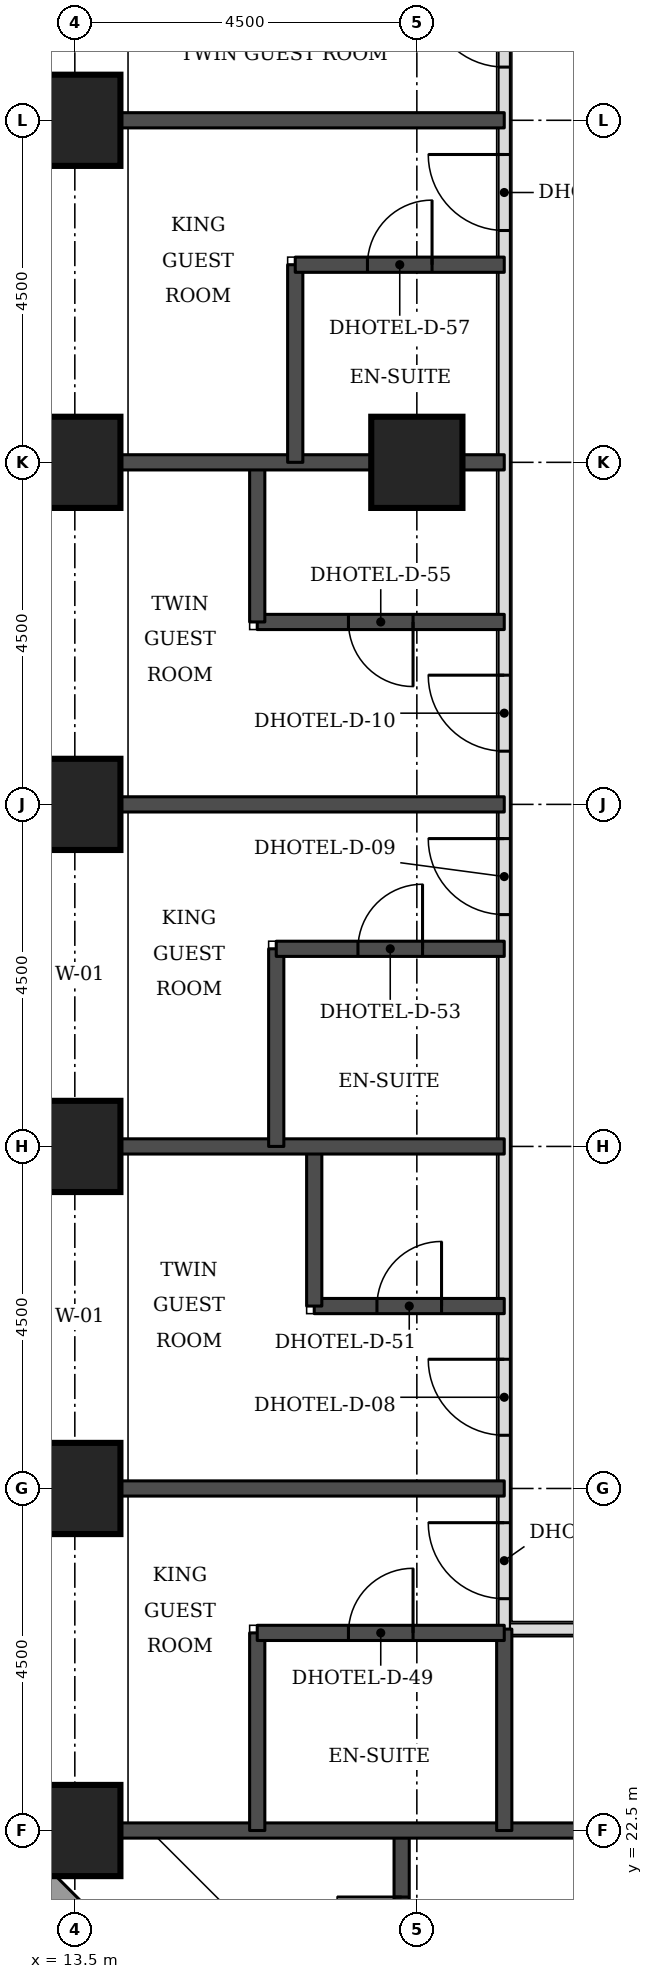
"""IFC4 building model, lengths in metres.
Left out: names, types, materials, properties, quantities, classifications, styles, units other than length and angle.
Written with IfcOpenShell. Run it as: python <this file> out.ifc"""

import sys

from ifc_helpers import new_model, si_unit, direction, frame, frame_2d, origin, origin_2d, place, context, subcontext, project, spatial, rectangle, extrude, element, fill, save


model = new_model("IFC4")
c1 = context("Model", 3, precision=1e-05, world=origin(), true_north=direction((0.0, 1.0)))
c2 = subcontext(c1, "Body", "Model", "MODEL_VIEW")
j1 = project(units=[si_unit("LENGTHUNIT", "METRE"), si_unit("PLANEANGLEUNIT", "RADIAN")], contexts=[c1])
p1 = place(None, origin())
s1 = spatial("IfcSite", under=j1, at=p1, CompositionType="ELEMENT")
p2 = place(p1, origin())
s2 = spatial("IfcBuilding", under=s1, at=p2, CompositionType="ELEMENT")
p3 = place(p2, frame((0.0, 0.0, 59.4)))
s3 = spatial("IfcBuildingStorey", under=s2, at=p3, CompositionType="ELEMENT", Elevation=59.4)
for number, where, z_axis, x_axis in (
    (1, (13.5, 22.5, 0.0), (0.0, 0.0, 1.0), (1.0, 0.0, 0.0)),
    (2, (13.5, 27.0, 0.0), (0.0, 0.0, 1.0), (1.0, 0.0, 0.0)),
    (3, (13.5, 31.5, 0.0), (0.0, 0.0, 1.0), (1.0, 0.0, 0.0)),
    (4, (13.5, 36.0, 0.0), (0.0, 0.0, 1.0), (1.0, 0.0, 0.0)),
    (5, (13.5, 40.5, 0.0), (0.0, 0.0, 1.0), (1.0, 0.0, 0.0)),
    (6, (18.0, 40.5, 0.0), (0.0, 0.0, 1.0), (1.0, 0.0, 0.0)),
    (7, (13.5, 45.0, 0.0), (0.0, 0.0, 1.0), (1.0, 0.0, 0.0)),
):
    element("IfcColumn", number, at=place(p3, frame(where, z_axis=z_axis, x_axis=x_axis)), inside=s3, PredefinedType="COLUMN", context=c2, shape_type="SweptSolid", body=[
        extrude(rectangle(XDim=1.2, YDim=1.2, at=origin_2d()), origin(), (0.0, 0.0, 1.0), 3.3),
    ])
p4 = place(p3, frame((12.674, 22.23, 0.0), z_axis=(0.0, 0.0, 1.0), x_axis=(0.707106781187, -0.707106781187, 0.0)))
e8 = element("IfcWall", 8, at=p4, inside=s3, PredefinedType="STANDARD", context=c2, shape_type="SweptSolid", body=[
    extrude(rectangle(XDim=7.151, YDim=0.35, at=frame_2d((3.576, 0.0))), origin(), (0.0, 0.0, 1.0), 3.055),
])
p5 = place(p4, frame((1.926, 0.0, 0.8)))
e9 = element("IfcOpeningElement", 9, at=p5, cuts=e8, PredefinedType="OPENING", context=c2, shape_type="SweptSolid", body=[
    extrude(rectangle(XDim=3.3, YDim=1.5, at=frame_2d((1.65, 0.75))), frame((0.0, 0.185, 0.0), z_axis=(0.0, -1.0, 0.0), x_axis=(1.0, 0.0, 0.0)), (0.0, 0.0, 1.0), 0.37),
])
p6 = place(p3, frame((19.15, 25.15, 0.0), z_axis=(0.0, 0.0, 1.0), x_axis=(1.0, 0.0, 0.0)))
e10 = element("IfcWall", 10, at=p6, inside=s3, PredefinedType="PARTITIONING", context=c2, shape_type="SweptSolid", body=[
    extrude(rectangle(XDim=32.35, YDim=0.15, at=frame_2d((16.175, 0.0))), origin(), (0.0, 0.0, 1.0), 3.08),
])
p7 = place(p6, frame((6.4, 0.0, 0.0)))
e11 = element("IfcOpeningElement", 11, at=p7, cuts=e10, PredefinedType="OPENING", context=c2, shape_type="SweptSolid", body=[
    extrude(rectangle(XDim=1.0, YDim=2.1, at=frame_2d((0.5, 1.05))), frame((0.0, 0.085, 0.0), z_axis=(0.0, -1.0, 0.0), x_axis=(1.0, 0.0, 0.0)), (0.0, 0.0, 1.0), 0.17),
])
p8 = place(p6, frame((10.5, 0.0, 0.0)))
e12 = element("IfcOpeningElement", 12, at=p8, cuts=e10, PredefinedType="OPENING", context=c2, shape_type="SweptSolid", body=[
    extrude(rectangle(XDim=1.0, YDim=2.1, at=frame_2d((0.5, 1.05))), frame((0.0, 0.085, 0.0), z_axis=(0.0, -1.0, 0.0), x_axis=(1.0, 0.0, 0.0)), (0.0, 0.0, 1.0), 0.17),
])
p9 = place(p6, frame((22.45, 0.0, 0.0)))
e13 = element("IfcOpeningElement", 13, at=p9, cuts=e10, PredefinedType="OPENING", context=c2, shape_type="SweptSolid", body=[
    extrude(rectangle(XDim=1.0, YDim=2.1, at=frame_2d((0.5, 1.05))), frame((0.0, 0.085, 0.0), z_axis=(0.0, -1.0, 0.0), x_axis=(1.0, 0.0, 0.0)), (0.0, 0.0, 1.0), 0.17),
])
p10 = place(p6, frame((26.55, 0.0, 0.0)))
e14 = element("IfcOpeningElement", 14, at=p10, cuts=e10, PredefinedType="OPENING", context=c2, shape_type="SweptSolid", body=[
    extrude(rectangle(XDim=1.0, YDim=2.1, at=frame_2d((0.5, 1.05))), frame((0.0, 0.085, 0.0), z_axis=(0.0, -1.0, 0.0), x_axis=(1.0, 0.0, 0.0)), (0.0, 0.0, 1.0), 0.17),
])
p11 = place(p6, frame((1.175, 0.0, 0.0)))
e15 = element("IfcOpeningElement", 15, at=p11, cuts=e10, PredefinedType="OPENING", context=c2, shape_type="SweptSolid", body=[
    extrude(rectangle(XDim=1.0, YDim=2.1, at=frame_2d((0.5, 1.05))), frame((0.0, 0.085, 0.0), z_axis=(0.0, -1.0, 0.0), x_axis=(1.0, 0.0, 0.0)), (0.0, 0.0, 1.0), 0.17),
])
p12 = place(p6, frame((30.85, 0.0, 0.0)))
e16 = element("IfcOpeningElement", 16, at=p12, cuts=e10, PredefinedType="OPENING", context=c2, shape_type="SweptSolid", body=[
    extrude(rectangle(XDim=1.0, YDim=2.1, at=frame_2d((0.5, 1.05))), frame((0.0, 0.085, 0.0), z_axis=(0.0, -1.0, 0.0), x_axis=(1.0, 0.0, 0.0)), (0.0, 0.0, 1.0), 0.17),
])
p13 = place(p3, frame((19.15, 25.15, 0.0), z_axis=(0.0, 0.0, 1.0), x_axis=(0.0, 1.0, 0.0)))
e17 = element("IfcWall", 17, at=p13, inside=s3, PredefinedType="PARTITIONING", context=c2, shape_type="SweptSolid", body=[
    extrude(rectangle(XDim=24.35, YDim=0.15, at=frame_2d((12.175, 0.0))), origin(), (0.0, 0.0, 1.0), 3.08),
])
p14 = place(p13, frame((0.4, 0.0, 0.0)))
e18 = element("IfcOpeningElement", 18, at=p14, cuts=e17, PredefinedType="OPENING", context=c2, shape_type="SweptSolid", body=[
    extrude(rectangle(XDim=1.0, YDim=2.1, at=frame_2d((0.5, 1.05))), frame((0.0, 0.085, 0.0), z_axis=(0.0, -1.0, 0.0), x_axis=(1.0, 0.0, 0.0)), (0.0, 0.0, 1.0), 0.17),
])
p15 = place(p13, frame((2.55, 0.0, 0.0)))
e19 = element("IfcOpeningElement", 19, at=p15, cuts=e17, PredefinedType="OPENING", context=c2, shape_type="SweptSolid", body=[
    extrude(rectangle(XDim=1.0, YDim=2.1, at=frame_2d((0.5, 1.05))), frame((0.0, 0.085, 0.0), z_axis=(0.0, -1.0, 0.0), x_axis=(1.0, 0.0, 0.0)), (0.0, 0.0, 1.0), 0.17),
])
p16 = place(p13, frame((9.4, 0.0, 0.0)))
e20 = element("IfcOpeningElement", 20, at=p16, cuts=e17, PredefinedType="OPENING", context=c2, shape_type="SweptSolid", body=[
    extrude(rectangle(XDim=1.0, YDim=2.1, at=frame_2d((0.5, 1.05))), frame((0.0, 0.085, 0.0), z_axis=(0.0, -1.0, 0.0), x_axis=(1.0, 0.0, 0.0)), (0.0, 0.0, 1.0), 0.17),
])
p17 = place(p13, frame((11.55, 0.0, 0.0)))
e21 = element("IfcOpeningElement", 21, at=p17, cuts=e17, PredefinedType="OPENING", context=c2, shape_type="SweptSolid", body=[
    extrude(rectangle(XDim=1.0, YDim=2.1, at=frame_2d((0.5, 1.05))), frame((0.0, 0.085, 0.0), z_axis=(0.0, -1.0, 0.0), x_axis=(1.0, 0.0, 0.0)), (0.0, 0.0, 1.0), 0.17),
])
p18 = place(p13, frame((18.4, 0.0, 0.0)))
e22 = element("IfcOpeningElement", 22, at=p18, cuts=e17, PredefinedType="OPENING", context=c2, shape_type="SweptSolid", body=[
    extrude(rectangle(XDim=1.0, YDim=2.1, at=frame_2d((0.5, 1.05))), frame((0.0, 0.085, 0.0), z_axis=(0.0, -1.0, 0.0), x_axis=(1.0, 0.0, 0.0)), (0.0, 0.0, 1.0), 0.17),
])
p19 = place(p13, frame((20.55, 0.0, 0.0)))
e23 = element("IfcOpeningElement", 23, at=p19, cuts=e17, PredefinedType="OPENING", context=c2, shape_type="SweptSolid", body=[
    extrude(rectangle(XDim=1.0, YDim=2.1, at=frame_2d((0.5, 1.05))), frame((0.0, 0.085, 0.0), z_axis=(0.0, -1.0, 0.0), x_axis=(1.0, 0.0, 0.0)), (0.0, 0.0, 1.0), 0.17),
])
p20 = place(p3, frame((17.8, 20.0, 0.0), z_axis=(0.0, 0.0, 1.0), x_axis=(0.0, 1.0, 0.0)))
e24 = element("IfcWall", 24, at=p20, inside=s3, PredefinedType="SOLIDWALL", context=c2, shape_type="SweptSolid", body=[
    extrude(rectangle(XDim=2.5, YDim=0.2, at=frame_2d((1.25, 0.0))), origin(), (0.0, 0.0, 1.0), 3.08),
])
p21 = place(p20, frame((0.775, 0.0, 0.0)))
e25 = element("IfcOpeningElement", 25, at=p21, cuts=e24, PredefinedType="OPENING", context=c2, shape_type="SweptSolid", body=[
    extrude(rectangle(XDim=0.85, YDim=2.1, at=frame_2d((0.425, 1.05))), frame((0.0, 0.11, 0.0), z_axis=(0.0, -1.0, 0.0), x_axis=(1.0, 0.0, 0.0)), (0.0, 0.0, 1.0), 0.22),
])
p22 = place(p3, frame((14.1, 22.5, 0.0), z_axis=(0.0, 0.0, 1.0), x_axis=(1.0, 0.0, 0.0)))
e26 = element("IfcWall", 26, at=p22, inside=s3, PredefinedType="SOLIDWALL", context=c2, shape_type="SweptSolid", body=[
    extrude(rectangle(XDim=6.1, YDim=0.2, at=frame_2d((3.05, 0.0))), origin(), (0.0, 0.0, 1.0), 3.08),
])
p23 = place(p3, frame((15.9, 22.5, 0.0), z_axis=(0.0, 0.0, 1.0), x_axis=(0.0, 1.0, 0.0)))
e27 = element("IfcWall", 27, at=p23, inside=s3, PredefinedType="SOLIDWALL", context=c2, shape_type="SweptSolid", body=[
    extrude(rectangle(XDim=2.6, YDim=0.2, at=frame_2d((1.3, 0.0))), origin(), (0.0, 0.0, 1.0), 3.08),
])
p24 = place(p3, frame((19.15, 22.5, 0.0), z_axis=(0.0, 0.0, 1.0), x_axis=(0.0, 1.0, 0.0)))
e28 = element("IfcWall", 28, at=p24, inside=s3, PredefinedType="SOLIDWALL", context=c2, shape_type="SweptSolid", body=[
    extrude(rectangle(XDim=2.65, YDim=0.2, at=frame_2d((1.325, 0.0))), origin(), (0.0, 0.0, 1.0), 3.08),
])
p25 = place(p3, frame((15.9, 25.1, 0.0), z_axis=(0.0, 0.0, 1.0), x_axis=(1.0, 0.0, 0.0)))
e29 = element("IfcWall", 29, at=p25, inside=s3, PredefinedType="SOLIDWALL", context=c2, shape_type="SweptSolid", body=[
    extrude(rectangle(XDim=3.25, YDim=0.2, at=frame_2d((1.625, 0.0))), origin(), (0.0, 0.0, 1.0), 3.08),
])
p26 = place(p25, frame((1.2, 0.0, 0.0)))
e30 = element("IfcOpeningElement", 30, at=p26, cuts=e29, PredefinedType="OPENING", context=c2, shape_type="SweptSolid", body=[
    extrude(rectangle(XDim=0.85, YDim=2.1, at=frame_2d((0.425, 1.05))), frame((0.0, 0.11, 0.0), z_axis=(0.0, -1.0, 0.0), x_axis=(1.0, 0.0, 0.0)), (0.0, 0.0, 1.0), 0.22),
])
p27 = place(p3, frame((14.1, 27.0, 0.0), z_axis=(0.0, 0.0, 1.0), x_axis=(1.0, 0.0, 0.0)))
e31 = element("IfcWall", 31, at=p27, inside=s3, PredefinedType="SOLIDWALL", context=c2, shape_type="SweptSolid", body=[
    extrude(rectangle(XDim=5.05, YDim=0.2, at=frame_2d((2.525, 0.0))), origin(), (0.0, 0.0, 1.0), 3.08),
])
p28 = place(p3, frame((16.65, 29.4, 0.0), z_axis=(0.0, 0.0, 1.0), x_axis=(1.0, 0.0, 0.0)))
e32 = element("IfcWall", 32, at=p28, inside=s3, PredefinedType="SOLIDWALL", context=c2, shape_type="SweptSolid", body=[
    extrude(rectangle(XDim=2.5, YDim=0.2, at=frame_2d((1.25, 0.0))), origin(), (0.0, 0.0, 1.0), 3.08),
])
p29 = place(p28, frame((0.825, 0.0, 0.0)))
e33 = element("IfcOpeningElement", 33, at=p29, cuts=e32, PredefinedType="OPENING", context=c2, shape_type="SweptSolid", body=[
    extrude(rectangle(XDim=0.85, YDim=2.1, at=frame_2d((0.425, 1.05))), frame((0.0, 0.11, 0.0), z_axis=(0.0, -1.0, 0.0), x_axis=(1.0, 0.0, 0.0)), (0.0, 0.0, 1.0), 0.22),
])
p30 = place(p3, frame((16.65, 29.4, 0.0), z_axis=(0.0, 0.0, 1.0), x_axis=(0.0, 1.0, 0.0)))
e34 = element("IfcWall", 34, at=p30, inside=s3, PredefinedType="SOLIDWALL", context=c2, shape_type="SweptSolid", body=[
    extrude(rectangle(XDim=2.1, YDim=0.2, at=frame_2d((1.05, 0.0))), origin(), (0.0, 0.0, 1.0), 3.08),
])
p31 = place(p3, frame((14.1, 31.5, 0.0), z_axis=(0.0, 0.0, 1.0), x_axis=(1.0, 0.0, 0.0)))
e35 = element("IfcWall", 35, at=p31, inside=s3, PredefinedType="SOLIDWALL", context=c2, shape_type="SweptSolid", body=[
    extrude(rectangle(XDim=5.05, YDim=0.2, at=frame_2d((2.525, 0.0))), origin(), (0.0, 0.0, 1.0), 3.08),
])
p32 = place(p3, frame((16.15, 31.5, 0.0), z_axis=(0.0, 0.0, 1.0), x_axis=(0.0, 1.0, 0.0)))
e36 = element("IfcWall", 36, at=p32, inside=s3, PredefinedType="SOLIDWALL", context=c2, shape_type="SweptSolid", body=[
    extrude(rectangle(XDim=2.6, YDim=0.2, at=frame_2d((1.3, 0.0))), origin(), (0.0, 0.0, 1.0), 3.08),
])
p33 = place(p3, frame((16.15, 34.1, 0.0), z_axis=(0.0, 0.0, 1.0), x_axis=(1.0, 0.0, 0.0)))
e37 = element("IfcWall", 37, at=p33, inside=s3, PredefinedType="SOLIDWALL", context=c2, shape_type="SweptSolid", body=[
    extrude(rectangle(XDim=3.0, YDim=0.2, at=frame_2d((1.5, 0.0))), origin(), (0.0, 0.0, 1.0), 3.08),
])
p34 = place(p33, frame((1.075, 0.0, 0.0)))
e38 = element("IfcOpeningElement", 38, at=p34, cuts=e37, PredefinedType="OPENING", context=c2, shape_type="SweptSolid", body=[
    extrude(rectangle(XDim=0.85, YDim=2.1, at=frame_2d((0.425, 1.05))), frame((0.0, 0.11, 0.0), z_axis=(0.0, -1.0, 0.0), x_axis=(1.0, 0.0, 0.0)), (0.0, 0.0, 1.0), 0.22),
])
p35 = place(p3, frame((14.1, 36.0, 0.0), z_axis=(0.0, 0.0, 1.0), x_axis=(1.0, 0.0, 0.0)))
e39 = element("IfcWall", 39, at=p35, inside=s3, PredefinedType="SOLIDWALL", context=c2, shape_type="SweptSolid", body=[
    extrude(rectangle(XDim=5.05, YDim=0.2, at=frame_2d((2.525, 0.0))), origin(), (0.0, 0.0, 1.0), 3.08),
])
p36 = place(p3, frame((15.9, 38.4, 0.0), z_axis=(0.0, 0.0, 1.0), x_axis=(1.0, 0.0, 0.0)))
e40 = element("IfcWall", 40, at=p36, inside=s3, PredefinedType="SOLIDWALL", context=c2, shape_type="SweptSolid", body=[
    extrude(rectangle(XDim=3.25, YDim=0.2, at=frame_2d((1.625, 0.0))), origin(), (0.0, 0.0, 1.0), 3.08),
])
p37 = place(p36, frame((1.2, 0.0, 0.0)))
e41 = element("IfcOpeningElement", 41, at=p37, cuts=e40, PredefinedType="OPENING", context=c2, shape_type="SweptSolid", body=[
    extrude(rectangle(XDim=0.85, YDim=2.1, at=frame_2d((0.425, 1.05))), frame((0.0, 0.11, 0.0), z_axis=(0.0, -1.0, 0.0), x_axis=(1.0, 0.0, 0.0)), (0.0, 0.0, 1.0), 0.22),
])
p38 = place(p3, frame((15.9, 38.4, 0.0), z_axis=(0.0, 0.0, 1.0), x_axis=(0.0, 1.0, 0.0)))
e42 = element("IfcWall", 42, at=p38, inside=s3, PredefinedType="SOLIDWALL", context=c2, shape_type="SweptSolid", body=[
    extrude(rectangle(XDim=2.1, YDim=0.2, at=frame_2d((1.05, 0.0))), origin(), (0.0, 0.0, 1.0), 3.08),
])
p39 = place(p3, frame((14.1, 40.5, 0.0), z_axis=(0.0, 0.0, 1.0), x_axis=(1.0, 0.0, 0.0)))
e43 = element("IfcWall", 43, at=p39, inside=s3, PredefinedType="SOLIDWALL", context=c2, shape_type="SweptSolid", body=[
    extrude(rectangle(XDim=5.05, YDim=0.2, at=frame_2d((2.525, 0.0))), origin(), (0.0, 0.0, 1.0), 3.08),
])
p40 = place(p3, frame((16.4, 40.5, 0.0), z_axis=(0.0, 0.0, 1.0), x_axis=(0.0, 1.0, 0.0)))
e44 = element("IfcWall", 44, at=p40, inside=s3, PredefinedType="SOLIDWALL", context=c2, shape_type="SweptSolid", body=[
    extrude(rectangle(XDim=2.6, YDim=0.2, at=frame_2d((1.3, 0.0))), origin(), (0.0, 0.0, 1.0), 3.08),
])
p41 = place(p3, frame((16.4, 43.1, 0.0), z_axis=(0.0, 0.0, 1.0), x_axis=(1.0, 0.0, 0.0)))
e45 = element("IfcWall", 45, at=p41, inside=s3, PredefinedType="SOLIDWALL", context=c2, shape_type="SweptSolid", body=[
    extrude(rectangle(XDim=2.75, YDim=0.2, at=frame_2d((1.375, 0.0))), origin(), (0.0, 0.0, 1.0), 3.08),
])
p42 = place(p41, frame((0.95, 0.0, 0.0)))
e46 = element("IfcOpeningElement", 46, at=p42, cuts=e45, PredefinedType="OPENING", context=c2, shape_type="SweptSolid", body=[
    extrude(rectangle(XDim=0.85, YDim=2.1, at=frame_2d((0.425, 1.05))), frame((0.0, 0.11, 0.0), z_axis=(0.0, -1.0, 0.0), x_axis=(1.0, 0.0, 0.0)), (0.0, 0.0, 1.0), 0.22),
])
p43 = place(p3, frame((14.1, 45.0, 0.0), z_axis=(0.0, 0.0, 1.0), x_axis=(1.0, 0.0, 0.0)))
e47 = element("IfcWall", 47, at=p43, inside=s3, PredefinedType="SOLIDWALL", context=c2, shape_type="SweptSolid", body=[
    extrude(rectangle(XDim=5.05, YDim=0.2, at=frame_2d((2.525, 0.0))), origin(), (0.0, 0.0, 1.0), 3.08),
])
p44 = place(p14, origin())
e48 = element("IfcDoor", 48, at=p44, inside=s3, OperationType="SINGLE_SWING_RIGHT", PredefinedType="DOOR", context=c2, shape_type="SweptSolid", body=[
    extrude(rectangle(XDim=1.0, YDim=2.1, at=frame_2d((0.5, 1.05))), frame((0.0, 0.025, 0.0), z_axis=(0.0, -1.0, 0.0), x_axis=(1.0, 0.0, 0.0)), (0.0, 0.0, 1.0), 0.05),
])
fill(e18, e48)
p45 = place(p26, origin())
e49 = element("IfcDoor", 49, at=p45, inside=s3, OperationType="SINGLE_SWING_RIGHT", PredefinedType="DOOR", context=c2, shape_type="SweptSolid", body=[
    extrude(rectangle(XDim=0.85, YDim=2.1, at=frame_2d((0.425, 1.05))), frame((0.0, 0.025, 0.0), z_axis=(0.0, -1.0, 0.0), x_axis=(1.0, 0.0, 0.0)), (0.0, 0.0, 1.0), 0.05),
])
fill(e30, e49)
p46 = place(p15, origin())
e50 = element("IfcDoor", 50, at=p46, inside=s3, OperationType="SINGLE_SWING_RIGHT", PredefinedType="DOOR", context=c2, shape_type="SweptSolid", body=[
    extrude(rectangle(XDim=1.0, YDim=2.1, at=frame_2d((0.5, 1.05))), frame((0.0, 0.025, 0.0), z_axis=(0.0, -1.0, 0.0), x_axis=(1.0, 0.0, 0.0)), (0.0, 0.0, 1.0), 0.05),
])
fill(e19, e50)
p47 = place(p29, origin())
e51 = element("IfcDoor", 51, at=p47, inside=s3, OperationType="SINGLE_SWING_RIGHT", PredefinedType="DOOR", context=c2, shape_type="SweptSolid", body=[
    extrude(rectangle(XDim=0.85, YDim=2.1, at=frame_2d((0.425, 1.05))), frame((0.0, 0.025, 0.0), z_axis=(0.0, -1.0, 0.0), x_axis=(1.0, 0.0, 0.0)), (0.0, 0.0, 1.0), 0.05),
])
fill(e33, e51)
p48 = place(p16, origin())
e52 = element("IfcDoor", 52, at=p48, inside=s3, OperationType="SINGLE_SWING_RIGHT", PredefinedType="DOOR", context=c2, shape_type="SweptSolid", body=[
    extrude(rectangle(XDim=1.0, YDim=2.1, at=frame_2d((0.5, 1.05))), frame((0.0, 0.025, 0.0), z_axis=(0.0, -1.0, 0.0), x_axis=(1.0, 0.0, 0.0)), (0.0, 0.0, 1.0), 0.05),
])
fill(e20, e52)
p49 = place(p34, origin())
e53 = element("IfcDoor", 53, at=p49, inside=s3, OperationType="SINGLE_SWING_RIGHT", PredefinedType="DOOR", context=c2, shape_type="SweptSolid", body=[
    extrude(rectangle(XDim=0.85, YDim=2.1, at=frame_2d((0.425, 1.05))), frame((0.0, 0.025, 0.0), z_axis=(0.0, -1.0, 0.0), x_axis=(1.0, 0.0, 0.0)), (0.0, 0.0, 1.0), 0.05),
])
fill(e38, e53)
p50 = place(p17, origin())
e54 = element("IfcDoor", 54, at=p50, inside=s3, OperationType="SINGLE_SWING_RIGHT", PredefinedType="DOOR", context=c2, shape_type="SweptSolid", body=[
    extrude(rectangle(XDim=1.0, YDim=2.1, at=frame_2d((0.5, 1.05))), frame((0.0, 0.025, 0.0), z_axis=(0.0, -1.0, 0.0), x_axis=(1.0, 0.0, 0.0)), (0.0, 0.0, 1.0), 0.05),
])
fill(e21, e54)
p51 = place(p37, frame((0.85, 0.0, 0.0), z_axis=(0.0, 0.0, 1.0), x_axis=(-1.0, 0.0, 0.0)))
e55 = element("IfcDoor", 55, at=p51, inside=s3, OperationType="SINGLE_SWING_LEFT", PredefinedType="DOOR", context=c2, shape_type="SweptSolid", body=[
    extrude(rectangle(XDim=0.85, YDim=2.1, at=frame_2d((0.425, 1.05))), frame((0.0, 0.025, 0.0), z_axis=(0.0, -1.0, 0.0), x_axis=(1.0, 0.0, 0.0)), (0.0, 0.0, 1.0), 0.05),
])
fill(e41, e55)
p52 = place(p18, origin())
e56 = element("IfcDoor", 56, at=p52, inside=s3, OperationType="SINGLE_SWING_RIGHT", PredefinedType="DOOR", context=c2, shape_type="SweptSolid", body=[
    extrude(rectangle(XDim=1.0, YDim=2.1, at=frame_2d((0.5, 1.05))), frame((0.0, 0.025, 0.0), z_axis=(0.0, -1.0, 0.0), x_axis=(1.0, 0.0, 0.0)), (0.0, 0.0, 1.0), 0.05),
])
fill(e22, e56)
p53 = place(p42, origin())
e57 = element("IfcDoor", 57, at=p53, inside=s3, OperationType="SINGLE_SWING_RIGHT", PredefinedType="DOOR", context=c2, shape_type="SweptSolid", body=[
    extrude(rectangle(XDim=0.85, YDim=2.1, at=frame_2d((0.425, 1.05))), frame((0.0, 0.025, 0.0), z_axis=(0.0, -1.0, 0.0), x_axis=(1.0, 0.0, 0.0)), (0.0, 0.0, 1.0), 0.05),
])
fill(e46, e57)
p54 = place(p19, origin())
e58 = element("IfcDoor", 58, at=p54, inside=s3, OperationType="SINGLE_SWING_RIGHT", PredefinedType="DOOR", context=c2, shape_type="SweptSolid", body=[
    extrude(rectangle(XDim=1.0, YDim=2.1, at=frame_2d((0.5, 1.05))), frame((0.0, 0.025, 0.0), z_axis=(0.0, -1.0, 0.0), x_axis=(1.0, 0.0, 0.0)), (0.0, 0.0, 1.0), 0.05),
])
fill(e23, e58)
p55 = place(p21, origin())
e59 = element("IfcDoor", 59, at=p55, inside=s3, OperationType="SINGLE_SWING_RIGHT", PredefinedType="DOOR", context=c2, shape_type="SweptSolid", body=[
    extrude(rectangle(XDim=0.85, YDim=2.1, at=frame_2d((0.425, 1.05))), frame((0.0, 0.025, 0.0), z_axis=(0.0, -1.0, 0.0), x_axis=(1.0, 0.0, 0.0)), (0.0, 0.0, 1.0), 0.05),
])
fill(e25, e59)
save(model, sys.argv[1])
